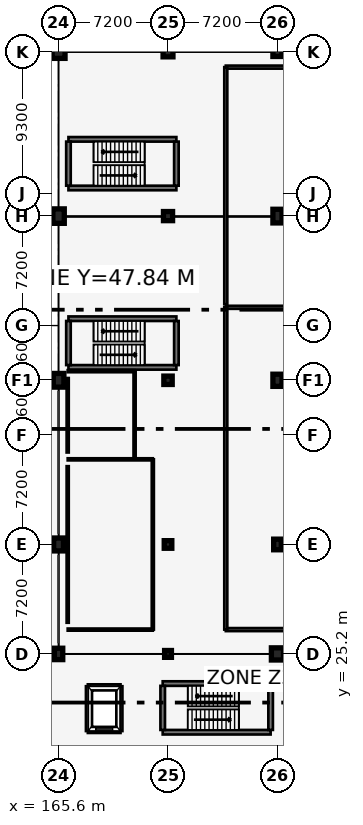
"""IFC4 building model, lengths in metres.
Left out: names, types, materials, properties, quantities, classifications, styles, units other than length and angle.
Written with IfcOpenShell. Run it as: python <this file> out.ifc"""

import sys

from ifc_helpers import new_model, si_unit, direction, frame, frame_2d, origin, origin_2d, place, context, subcontext, project, spatial, rectangle, circle, extrude, element, fill, save


model = new_model("IFC4")
c1 = context("Model", 3, precision=1e-05, world=origin(), true_north=direction((0.0, 1.0)))
c2 = subcontext(c1, "Body", "Model", "MODEL_VIEW")
j1 = project(units=[si_unit("LENGTHUNIT", "METRE"), si_unit("PLANEANGLEUNIT", "RADIAN")], contexts=[c1])
p1 = place(None, origin())
s1 = spatial("IfcSite", under=j1, at=p1, CompositionType="ELEMENT")
p2 = place(p1, origin())
s2 = spatial("IfcBuilding", under=s1, at=p2, CompositionType="ELEMENT")
p3 = place(p2, origin())
s3 = spatial("IfcBuildingStorey", under=s2, at=p3, CompositionType="ELEMENT", Elevation=0.0)
p4 = place(p3, frame((165.6, 25.2, 0.0), z_axis=(0.0, 0.0, 1.0), x_axis=(1.0, 0.0, 0.0)))
e1 = element("IfcColumn", 1, at=p4, inside=s3, PredefinedType="COLUMN", context=c2, shape_type="SweptSolid", body=[
    extrude(rectangle(XDim=0.55, YDim=0.75, at=origin_2d()), origin(), (0.0, 0.0, 1.0), 4.8),
])
p5 = place(p3, frame((165.6, 32.4, 0.0), z_axis=(0.0, 0.0, 1.0), x_axis=(1.0, 0.0, 0.0)))
e2 = element("IfcColumn", 2, at=p5, inside=s3, PredefinedType="COLUMN", context=c2, shape_type="SweptSolid", body=[
    extrude(rectangle(XDim=0.65, YDim=0.85, at=origin_2d()), origin(), (0.0, 0.0, 1.0), 4.8),
])
p6 = place(p3, frame((165.6, 43.2, 0.0), z_axis=(0.0, 0.0, 1.0), x_axis=(1.0, 0.0, 0.0)))
e3 = element("IfcColumn", 3, at=p6, inside=s3, PredefinedType="COLUMN", context=c2, shape_type="SweptSolid", body=[
    extrude(rectangle(XDim=0.7, YDim=0.9, at=origin_2d()), origin(), (0.0, 0.0, 1.0), 4.8),
])
p7 = place(p3, frame((165.6, 54.0, 0.0), z_axis=(0.0, 0.0, 1.0), x_axis=(1.0, 0.0, 0.0)))
e4 = element("IfcColumn", 4, at=p7, inside=s3, PredefinedType="COLUMN", context=c2, shape_type="SweptSolid", body=[
    extrude(rectangle(XDim=0.75, YDim=0.95, at=origin_2d()), origin(), (0.0, 0.0, 1.0), 4.8),
])
p8 = place(p3, frame((165.6, 64.8, 0.0), z_axis=(0.0, 0.0, 1.0), x_axis=(1.0, 0.0, 0.0)))
e5 = element("IfcColumn", 5, at=p8, inside=s3, PredefinedType="COLUMN", context=c2, shape_type="SweptSolid", body=[
    extrude(rectangle(XDim=0.85, YDim=0.85, at=origin_2d()), origin(), (0.0, 0.0, 1.0), 4.8),
])
p9 = place(p3, frame((172.8, 25.2, 0.0), z_axis=(0.0, 0.0, 1.0), x_axis=(1.0, 0.0, 0.0)))
e6 = element("IfcColumn", 6, at=p9, inside=s3, PredefinedType="COLUMN", context=c2, shape_type="SweptSolid", body=[
    extrude(rectangle(XDim=0.45, YDim=0.45, at=origin_2d()), origin(), (0.0, 0.0, 1.0), 4.8),
])
p10 = place(p3, frame((172.8, 32.4, 0.0), z_axis=(0.0, 0.0, 1.0), x_axis=(1.0, 0.0, 0.0)))
e7 = element("IfcColumn", 7, at=p10, inside=s3, PredefinedType="COLUMN", context=c2, shape_type="SweptSolid", body=[
    extrude(rectangle(XDim=0.5, YDim=0.5, at=origin_2d()), origin(), (0.0, 0.0, 1.0), 4.8),
])
p11 = place(p3, frame((172.8, 43.2, 0.0), z_axis=(0.0, 0.0, 1.0), x_axis=(1.0, 0.0, 0.0)))
e8 = element("IfcColumn", 8, at=p11, inside=s3, PredefinedType="COLUMN", context=c2, shape_type="SweptSolid", body=[
    extrude(rectangle(XDim=0.55, YDim=0.55, at=origin_2d()), origin(), (0.0, 0.0, 1.0), 4.8),
])
p12 = place(p3, frame((172.8, 54.0, 0.0), z_axis=(0.0, 0.0, 1.0), x_axis=(1.0, 0.0, 0.0)))
e9 = element("IfcColumn", 9, at=p12, inside=s3, PredefinedType="COLUMN", context=c2, shape_type="SweptSolid", body=[
    extrude(rectangle(XDim=0.6, YDim=0.6, at=origin_2d()), origin(), (0.0, 0.0, 1.0), 4.8),
])
p13 = place(p3, frame((172.8, 64.8, 0.0), z_axis=(0.0, 0.0, 1.0), x_axis=(1.0, 0.0, 0.0)))
e10 = element("IfcColumn", 10, at=p13, inside=s3, PredefinedType="COLUMN", context=c2, shape_type="SweptSolid", body=[
    extrude(rectangle(XDim=0.65, YDim=0.65, at=origin_2d()), origin(), (0.0, 0.0, 1.0), 4.8),
])
p14 = place(p3, frame((180.0, 25.2, 0.0), z_axis=(0.0, 0.0, 1.0), x_axis=(1.0, 0.0, 0.0)))
e11 = element("IfcColumn", 11, at=p14, inside=s3, PredefinedType="COLUMN", context=c2, shape_type="SweptSolid", body=[
    extrude(rectangle(XDim=0.8, YDim=0.8, at=origin_2d()), origin(), (0.0, 0.0, 1.0), 4.8),
])
p15 = place(p3, frame((180.0, 32.4, 0.0), z_axis=(0.0, 0.0, 1.0), x_axis=(1.0, 0.0, 0.0)))
e12 = element("IfcColumn", 12, at=p15, inside=s3, PredefinedType="COLUMN", context=c2, shape_type="SweptSolid", body=[
    extrude(rectangle(XDim=0.5, YDim=0.7, at=origin_2d()), origin(), (0.0, 0.0, 1.0), 4.8),
])
p16 = place(p3, frame((180.0, 43.2, 0.0), z_axis=(0.0, 0.0, 1.0), x_axis=(1.0, 0.0, 0.0)))
e13 = element("IfcColumn", 13, at=p16, inside=s3, PredefinedType="COLUMN", context=c2, shape_type="SweptSolid", body=[
    extrude(rectangle(XDim=0.6, YDim=0.8, at=origin_2d()), origin(), (0.0, 0.0, 1.0), 4.8),
])
p17 = place(p3, frame((180.0, 54.0, 0.0), z_axis=(0.0, 0.0, 1.0), x_axis=(1.0, 0.0, 0.0)))
e14 = element("IfcColumn", 14, at=p17, inside=s3, PredefinedType="COLUMN", context=c2, shape_type="SweptSolid", body=[
    extrude(rectangle(XDim=0.6, YDim=0.9, at=origin_2d()), origin(), (0.0, 0.0, 1.0), 4.8),
])
p18 = place(p3, frame((180.0, 64.8, 0.0), z_axis=(0.0, 0.0, 1.0), x_axis=(1.0, 0.0, 0.0)))
e15 = element("IfcColumn", 15, at=p18, inside=s3, PredefinedType="COLUMN", context=c2, shape_type="SweptSolid", body=[
    extrude(circle(Radius=0.3, at=origin_2d()), origin(), (0.0, 0.0, 1.0), 4.8),
])
p19 = place(p3, frame((172.45, 20.05, 0.0), z_axis=(0.0, 0.0, 1.0), x_axis=(1.0, 0.0, 0.0)))
e16 = element("IfcWall", 16, at=p19, inside=s3, PredefinedType="SHEAR", context=c2, shape_type="SweptSolid", body=[
    extrude(rectangle(XDim=7.1, YDim=0.3, at=frame_2d((3.55, 0.0))), origin(), (0.0, 0.0, 1.0), 4.525),
])
p20 = place(p19, frame((0.35, 0.0, 0.0)))
e17 = element("IfcOpeningElement", 17, at=p20, cuts=e16, PredefinedType="OPENING", context=c2, shape_type="SweptSolid", body=[
    extrude(rectangle(XDim=1.05, YDim=2.15, at=frame_2d((0.525, 1.075))), frame((0.0, 0.16, 0.0), z_axis=(0.0, -1.0, 0.0), x_axis=(1.0, 0.0, 0.0)), (0.0, 0.0, 1.0), 0.32),
])
p21 = place(p3, frame((179.55, 23.25, 0.0), z_axis=(0.0, 0.0, 1.0), x_axis=(-1.0, 0.0, 0.0)))
e18 = element("IfcWall", 18, at=p21, inside=s3, PredefinedType="SHEAR", context=c2, shape_type="SweptSolid", body=[
    extrude(rectangle(XDim=7.1, YDim=0.3, at=frame_2d((3.55, 0.0))), origin(), (0.0, 0.0, 1.0), 4.525),
])
for number, where, z_axis, x_axis in (
    (19, (179.55, 20.2, 0.0), (0.0, 0.0, 1.0), (0.0, 1.0, 0.0)),
    (20, (172.45, 23.1, 0.0), (0.0, 0.0, 1.0), (0.0, -1.0, 0.0)),
):
    element("IfcWall", number, at=place(p3, frame(where, z_axis=z_axis, x_axis=x_axis)), inside=s3, PredefinedType="SHEAR", context=c2, shape_type="SweptSolid", body=[
        extrude(rectangle(XDim=2.9, YDim=0.3, at=frame_2d((1.45, 0.0))), origin(), (0.0, 0.0, 1.0), 4.525),
    ])
for number, where, z_axis, x_axis in (
    (21, (166.25, 44.05, 0.0), (0.0, 0.0, 1.0), (1.0, 0.0, 0.0)),
    (22, (173.35, 47.25, 0.0), (0.0, 0.0, 1.0), (-1.0, 0.0, 0.0)),
):
    element("IfcWall", number, at=place(p3, frame(where, z_axis=z_axis, x_axis=x_axis)), inside=s3, PredefinedType="SHEAR", context=c2, shape_type="SweptSolid", body=[
        extrude(rectangle(XDim=7.1, YDim=0.3, at=frame_2d((3.55, 0.0))), origin(), (0.0, 0.0, 1.0), 4.525),
    ])
p22 = place(p3, frame((173.35, 44.2, 0.0), z_axis=(0.0, 0.0, 1.0), x_axis=(0.0, 1.0, 0.0)))
e23 = element("IfcWall", 23, at=p22, inside=s3, PredefinedType="SHEAR", context=c2, shape_type="SweptSolid", body=[
    extrude(rectangle(XDim=2.9, YDim=0.3, at=frame_2d((1.45, 0.0))), origin(), (0.0, 0.0, 1.0), 4.525),
])
p23 = place(p3, frame((166.25, 47.1, 0.0), z_axis=(0.0, 0.0, 1.0), x_axis=(0.0, -1.0, 0.0)))
e24 = element("IfcWall", 24, at=p23, inside=s3, PredefinedType="SHEAR", context=c2, shape_type="SweptSolid", body=[
    extrude(rectangle(XDim=2.9, YDim=0.3, at=frame_2d((1.45, 0.0))), origin(), (0.0, 0.0, 1.0), 4.525),
])
p24 = place(p23, frame((0.75, 0.0, 0.0)))
e25 = element("IfcOpeningElement", 25, at=p24, cuts=e24, PredefinedType="OPENING", context=c2, shape_type="SweptSolid", body=[
    extrude(rectangle(XDim=1.05, YDim=2.15, at=frame_2d((0.525, 1.075))), frame((0.0, 0.16, 0.0), z_axis=(0.0, -1.0, 0.0), x_axis=(1.0, 0.0, 0.0)), (0.0, 0.0, 1.0), 0.32),
])
for number, where, z_axis, x_axis in (
    (26, (166.25, 55.85, 0.0), (0.0, 0.0, 1.0), (1.0, 0.0, 0.0)),
    (27, (173.35, 59.05, 0.0), (0.0, 0.0, 1.0), (-1.0, 0.0, 0.0)),
):
    element("IfcWall", number, at=place(p3, frame(where, z_axis=z_axis, x_axis=x_axis)), inside=s3, PredefinedType="SHEAR", context=c2, shape_type="SweptSolid", body=[
        extrude(rectangle(XDim=7.1, YDim=0.3, at=frame_2d((3.55, 0.0))), origin(), (0.0, 0.0, 1.0), 4.525),
    ])
p25 = place(p3, frame((173.35, 56.0, 0.0), z_axis=(0.0, 0.0, 1.0), x_axis=(0.0, 1.0, 0.0)))
e28 = element("IfcWall", 28, at=p25, inside=s3, PredefinedType="SHEAR", context=c2, shape_type="SweptSolid", body=[
    extrude(rectangle(XDim=2.9, YDim=0.3, at=frame_2d((1.45, 0.0))), origin(), (0.0, 0.0, 1.0), 4.525),
])
p26 = place(p3, frame((166.25, 58.9, 0.0), z_axis=(0.0, 0.0, 1.0), x_axis=(0.0, -1.0, 0.0)))
e29 = element("IfcWall", 29, at=p26, inside=s3, PredefinedType="SHEAR", context=c2, shape_type="SweptSolid", body=[
    extrude(rectangle(XDim=2.9, YDim=0.3, at=frame_2d((1.45, 0.0))), origin(), (0.0, 0.0, 1.0), 4.525),
])
p27 = place(p26, frame((0.75, 0.0, 0.0)))
e30 = element("IfcOpeningElement", 30, at=p27, cuts=e29, PredefinedType="OPENING", context=c2, shape_type="SweptSolid", body=[
    extrude(rectangle(XDim=1.05, YDim=2.15, at=frame_2d((0.525, 1.075))), frame((0.0, 0.16, 0.0), z_axis=(0.0, -1.0, 0.0), x_axis=(1.0, 0.0, 0.0)), (0.0, 0.0, 1.0), 0.32),
])
p28 = place(p3, frame((167.525, 20.125, 0.0), z_axis=(0.0, 0.0, 1.0), x_axis=(1.0, 0.0, 0.0)))
e31 = element("IfcWall", 31, at=p28, inside=s3, PredefinedType="SHEAR", context=c2, shape_type="SweptSolid", body=[
    extrude(rectangle(XDim=2.15, YDim=0.25, at=frame_2d((1.075, 0.0))), origin(), (0.0, 0.0, 1.0), 4.5),
])
p29 = place(p3, frame((169.675, 23.075, 0.0), z_axis=(0.0, 0.0, 1.0), x_axis=(-1.0, 0.0, 0.0)))
e32 = element("IfcWall", 32, at=p29, inside=s3, PredefinedType="SHEAR", context=c2, shape_type="SweptSolid", body=[
    extrude(rectangle(XDim=2.15, YDim=0.25, at=frame_2d((1.075, 0.0))), origin(), (0.0, 0.0, 1.0), 4.5),
])
p30 = place(p29, frame((0.525, 0.0, 0.0)))
e33 = element("IfcOpeningElement", 33, at=p30, cuts=e32, PredefinedType="OPENING", context=c2, shape_type="SweptSolid", body=[
    extrude(rectangle(XDim=1.1, YDim=2.15, at=frame_2d((0.55, 1.075))), frame((0.0, 0.135, 0.0), z_axis=(0.0, -1.0, 0.0), x_axis=(1.0, 0.0, 0.0)), (0.0, 0.0, 1.0), 0.27),
])
for number, where, z_axis, x_axis in (
    (34, (167.525, 23.075, 0.0), (0.0, 0.0, 1.0), (0.0, -1.0, 0.0)),
    (35, (169.675, 20.125, 0.0), (0.0, 0.0, 1.0), (0.0, 1.0, 0.0)),
):
    element("IfcWall", number, at=place(p3, frame(where, z_axis=z_axis, x_axis=x_axis)), inside=s3, PredefinedType="SHEAR", context=c2, shape_type="SweptSolid", body=[
        extrude(rectangle(XDim=2.95, YDim=0.25, at=frame_2d((1.475, 0.0))), origin(), (0.0, 0.0, 1.0), 4.5),
    ])
for number, where, z_axis, x_axis in (
    (36, (166.2, 38.0, 0.0), (0.0, 0.0, 1.0), (1.0, 0.0, 0.0)),
    (37, (171.8, 26.8, 0.0), (0.0, 0.0, 1.0), (-1.0, 0.0, 0.0)),
):
    element("IfcWall", number, at=place(p3, frame(where, z_axis=z_axis, x_axis=x_axis)), inside=s3, PredefinedType="PARTITIONING", context=c2, shape_type="SweptSolid", body=[
        extrude(rectangle(XDim=5.6, YDim=0.14, at=frame_2d((2.8, 0.0))), origin(), (0.0, 0.0, 1.0), 3.8),
    ])
p31 = place(p3, frame((166.2, 37.55, 0.0), z_axis=(0.0, 0.0, 1.0), x_axis=(0.0, -1.0, 0.0)))
e38 = element("IfcWall", 38, at=p31, inside=s3, PredefinedType="PARTITIONING", context=c2, shape_type="SweptSolid", body=[
    extrude(rectangle(XDim=10.3, YDim=0.14, at=frame_2d((5.15, 0.0))), origin(), (0.0, 0.0, 1.0), 3.8),
])
p32 = place(p3, frame((171.8, 26.8, 0.0), z_axis=(0.0, 0.0, 1.0), x_axis=(0.0, 1.0, 0.0)))
e39 = element("IfcWall", 39, at=p32, inside=s3, PredefinedType="PARTITIONING", context=c2, shape_type="SweptSolid", body=[
    extrude(rectangle(XDim=11.2, YDim=0.14, at=frame_2d((5.6, 0.0))), origin(), (0.0, 0.0, 1.0), 3.8),
])
p33 = place(p32, frame((3.066, 0.0, 0.0)))
e40 = element("IfcOpeningElement", 40, at=p33, cuts=e39, PredefinedType="OPENING", context=c2, shape_type="SweptSolid", body=[
    extrude(rectangle(XDim=0.98, YDim=2.15, at=frame_2d((0.49, 1.075))), frame((0.0, 0.08, 0.0), z_axis=(0.0, -1.0, 0.0), x_axis=(1.0, 0.0, 0.0)), (0.0, 0.0, 1.0), 0.16),
])
p34 = place(p3, frame((166.2, 43.8, 0.0), z_axis=(0.0, 0.0, 1.0), x_axis=(1.0, 0.0, 0.0)))
e41 = element("IfcWall", 41, at=p34, inside=s3, PredefinedType="PARTITIONING", context=c2, shape_type="SweptSolid", body=[
    extrude(rectangle(XDim=4.4, YDim=0.14, at=frame_2d((2.2, 0.0))), origin(), (0.0, 0.0, 1.0), 3.8),
])
p35 = place(p3, frame((166.2, 43.35, 0.0), z_axis=(0.0, 0.0, 1.0), x_axis=(0.0, -1.0, 0.0)))
e42 = element("IfcWall", 42, at=p35, inside=s3, PredefinedType="PARTITIONING", context=c2, shape_type="SweptSolid", body=[
    extrude(rectangle(XDim=4.9, YDim=0.14, at=frame_2d((2.45, 0.0))), origin(), (0.0, 0.0, 1.0), 3.707),
])
p36 = place(p3, frame((170.6, 38.2, 0.0), z_axis=(0.0, 0.0, 1.0), x_axis=(0.0, 1.0, 0.0)))
e43 = element("IfcWall", 43, at=p36, inside=s3, PredefinedType="PARTITIONING", context=c2, shape_type="SweptSolid", body=[
    extrude(rectangle(XDim=5.6, YDim=0.14, at=frame_2d((2.8, 0.0))), origin(), (0.0, 0.0, 1.0), 3.707),
])
p37 = place(p36, frame((2.305, 0.0, 0.0)))
e44 = element("IfcOpeningElement", 44, at=p37, cuts=e43, PredefinedType="OPENING", context=c2, shape_type="SweptSolid", body=[
    extrude(rectangle(XDim=0.99, YDim=2.15, at=frame_2d((0.495, 1.075))), frame((0.0, 0.08, 0.0), z_axis=(0.0, -1.0, 0.0), x_axis=(1.0, 0.0, 0.0)), (0.0, 0.0, 1.0), 0.16),
])
p38 = place(p3, frame((176.6, 48.0, 0.0), z_axis=(0.0, 0.0, 1.0), x_axis=(1.0, 0.0, 0.0)))
e45 = element("IfcWall", 45, at=p38, inside=s3, PredefinedType="SOLIDWALL", context=c2, shape_type="SweptSolid", body=[
    extrude(rectangle(XDim=9.8, YDim=0.2, at=frame_2d((4.9, 0.0))), origin(), (0.0, 0.0, 1.0), 4.0),
])
p39 = place(p3, frame((186.4, 26.8, 0.0), z_axis=(0.0, 0.0, 1.0), x_axis=(-1.0, 0.0, 0.0)))
e46 = element("IfcWall", 46, at=p39, inside=s3, PredefinedType="SOLIDWALL", context=c2, shape_type="SweptSolid", body=[
    extrude(rectangle(XDim=9.8, YDim=0.2, at=frame_2d((4.9, 0.0))), origin(), (0.0, 0.0, 1.0), 3.557),
])
p40 = place(p3, frame((176.6, 48.0, 0.0), z_axis=(0.0, 0.0, 1.0), x_axis=(0.0, -1.0, 0.0)))
e47 = element("IfcWall", 47, at=p40, inside=s3, PredefinedType="SOLIDWALL", context=c2, shape_type="SweptSolid", body=[
    extrude(rectangle(XDim=21.2, YDim=0.2, at=frame_2d((10.6, 0.0))), origin(), (0.0, 0.0, 1.0), 3.757),
])
p41 = place(p40, frame((9.7, 0.0, 0.0)))
e48 = element("IfcOpeningElement", 48, at=p41, cuts=e47, PredefinedType="OPENING", context=c2, shape_type="SweptSolid", body=[
    extrude(rectangle(XDim=1.8, YDim=2.2, at=frame_2d((0.9, 1.1))), frame((0.0, 0.11, 0.0), z_axis=(0.0, -1.0, 0.0), x_axis=(1.0, 0.0, 0.0)), (0.0, 0.0, 1.0), 0.22),
])
p42 = place(p3, frame((176.6, 63.8, 0.0), z_axis=(0.0, 0.0, 1.0), x_axis=(1.0, 0.0, 0.0)))
e49 = element("IfcWall", 49, at=p42, inside=s3, PredefinedType="SOLIDWALL", context=c2, shape_type="SweptSolid", body=[
    extrude(rectangle(XDim=9.8, YDim=0.2, at=frame_2d((4.9, 0.0))), origin(), (0.0, 0.0, 1.0), 4.0),
])
p43 = place(p3, frame((176.6, 63.8, 0.0), z_axis=(0.0, 0.0, 1.0), x_axis=(0.0, -1.0, 0.0)))
e50 = element("IfcWall", 50, at=p43, inside=s3, PredefinedType="SOLIDWALL", context=c2, shape_type="SweptSolid", body=[
    extrude(rectangle(XDim=15.6, YDim=0.2, at=frame_2d((7.8, 0.0))), origin(), (0.0, 0.0, 1.0), 4.0),
])
p44 = place(p43, frame((6.9, 0.0, 0.0)))
e51 = element("IfcOpeningElement", 51, at=p44, cuts=e50, PredefinedType="OPENING", context=c2, shape_type="SweptSolid", body=[
    extrude(rectangle(XDim=1.8, YDim=2.2, at=frame_2d((0.9, 1.1))), frame((0.0, 0.11, 0.0), z_axis=(0.0, -1.0, 0.0), x_axis=(1.0, 0.0, 0.0)), (0.0, 0.0, 1.0), 0.22),
])
p45 = place(p20, frame((1.05, 0.0, 0.0), z_axis=(0.0, 0.0, 1.0), x_axis=(-1.0, 0.0, 0.0)))
e52 = element("IfcDoor", 52, at=p45, inside=s3, OperationType="SINGLE_SWING_LEFT", PredefinedType="DOOR", context=c2, shape_type="SweptSolid", body=[
    extrude(rectangle(XDim=1.05, YDim=2.15, at=frame_2d((0.525, 1.075))), frame((0.0, 0.025, 0.0), z_axis=(0.0, -1.0, 0.0), x_axis=(1.0, 0.0, 0.0)), (0.0, 0.0, 1.0), 0.05),
])
fill(e17, e52)
p46 = place(p24, frame((1.05, 0.0, 0.0), z_axis=(0.0, 0.0, 1.0), x_axis=(-1.0, 0.0, 0.0)))
e53 = element("IfcDoor", 53, at=p46, inside=s3, OperationType="SINGLE_SWING_LEFT", PredefinedType="DOOR", context=c2, shape_type="SweptSolid", body=[
    extrude(rectangle(XDim=1.05, YDim=2.15, at=frame_2d((0.525, 1.075))), frame((0.0, 0.025, 0.0), z_axis=(0.0, -1.0, 0.0), x_axis=(1.0, 0.0, 0.0)), (0.0, 0.0, 1.0), 0.05),
])
fill(e25, e53)
p47 = place(p27, frame((1.05, 0.0, 0.0), z_axis=(0.0, 0.0, 1.0), x_axis=(-1.0, 0.0, 0.0)))
e54 = element("IfcDoor", 54, at=p47, inside=s3, OperationType="SINGLE_SWING_LEFT", PredefinedType="DOOR", context=c2, shape_type="SweptSolid", body=[
    extrude(rectangle(XDim=1.05, YDim=2.15, at=frame_2d((0.525, 1.075))), frame((0.0, 0.025, 0.0), z_axis=(0.0, -1.0, 0.0), x_axis=(1.0, 0.0, 0.0)), (0.0, 0.0, 1.0), 0.05),
])
fill(e30, e54)
p48 = place(p30, origin())
e55 = element("IfcDoor", 55, at=p48, inside=s3, OperationType="SLIDING_TO_LEFT", PredefinedType="DOOR", context=c2, shape_type="SweptSolid", body=[
    extrude(rectangle(XDim=1.1, YDim=2.15, at=frame_2d((0.55, 1.075))), frame((0.0, 0.025, 0.0), z_axis=(0.0, -1.0, 0.0), x_axis=(1.0, 0.0, 0.0)), (0.0, 0.0, 1.0), 0.05),
])
fill(e33, e55)
p49 = place(p33, origin())
e56 = element("IfcDoor", 56, at=p49, inside=s3, OperationType="SINGLE_SWING_LEFT", PredefinedType="DOOR", context=c2, shape_type="SweptSolid", body=[
    extrude(rectangle(XDim=0.98, YDim=2.15, at=frame_2d((0.49, 1.075))), frame((0.0, 0.025, 0.0), z_axis=(0.0, -1.0, 0.0), x_axis=(1.0, 0.0, 0.0)), (0.0, 0.0, 1.0), 0.05),
])
fill(e40, e56)
p50 = place(p37, origin())
e57 = element("IfcDoor", 57, at=p50, inside=s3, OperationType="SINGLE_SWING_RIGHT", PredefinedType="DOOR", context=c2, shape_type="SweptSolid", body=[
    extrude(rectangle(XDim=0.99, YDim=2.15, at=frame_2d((0.495, 1.075))), frame((0.0, 0.025, 0.0), z_axis=(0.0, -1.0, 0.0), x_axis=(1.0, 0.0, 0.0)), (0.0, 0.0, 1.0), 0.05),
])
fill(e44, e57)
p51 = place(p41, origin())
e58 = element("IfcDoor", 58, at=p51, inside=s3, OperationType="DOUBLE_SWING_LEFT", PredefinedType="DOOR", context=c2, shape_type="SweptSolid", body=[
    extrude(rectangle(XDim=1.8, YDim=2.2, at=frame_2d((0.9, 1.1))), frame((0.0, 0.025, 0.0), z_axis=(0.0, -1.0, 0.0), x_axis=(1.0, 0.0, 0.0)), (0.0, 0.0, 1.0), 0.05),
])
fill(e48, e58)
p52 = place(p44, origin())
e59 = element("IfcDoor", 59, at=p52, inside=s3, OperationType="DOUBLE_SWING_LEFT", PredefinedType="DOOR", context=c2, shape_type="SweptSolid", body=[
    extrude(rectangle(XDim=1.8, YDim=2.2, at=frame_2d((0.9, 1.1))), frame((0.0, 0.025, 0.0), z_axis=(0.0, -1.0, 0.0), x_axis=(1.0, 0.0, 0.0)), (0.0, 0.0, 1.0), 0.05),
])
fill(e51, e59)
save(model, sys.argv[1])
